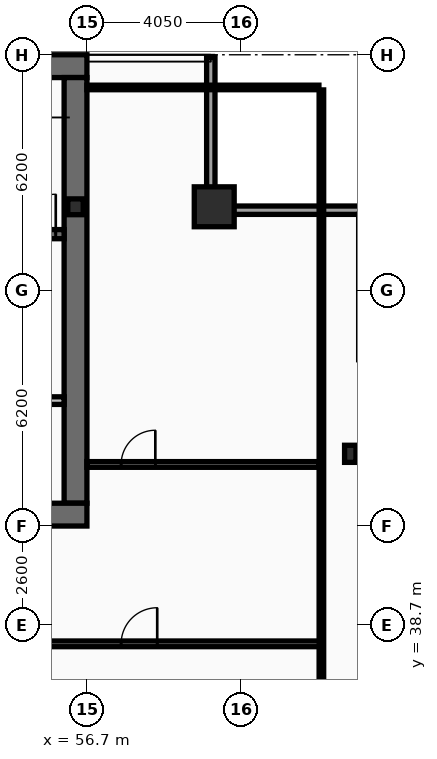
"""IFC4 building model, lengths in metres.
Left out: names, types, materials, properties, quantities, classifications, styles, units other than length and angle.
Written with IfcOpenShell. Run it as: python <this file> out.ifc"""

import sys

from ifc_helpers import new_model, si_unit, direction, frame, frame_2d, origin, origin_2d, place, context, subcontext, project, spatial, rectangle, hollow_rectangle, i_section, extrude, element, fill, save


model = new_model("IFC4")
c1 = context("Model", 3, precision=1e-05, world=origin(), true_north=direction((0.0, 1.0)))
c2 = subcontext(c1, "Body", "Model", "MODEL_VIEW")
j1 = project(units=[si_unit("LENGTHUNIT", "METRE"), si_unit("PLANEANGLEUNIT", "RADIAN")], contexts=[c1])
p1 = place(None, origin())
s1 = spatial("IfcSite", under=j1, at=p1, CompositionType="ELEMENT")
p2 = place(p1, origin())
s2 = spatial("IfcBuilding", under=s1, at=p2, CompositionType="ELEMENT")
p3 = place(p2, frame((0.0, 0.0, 239.0)))
s3 = spatial("IfcBuildingStorey", under=s2, at=p3, CompositionType="ELEMENT", Elevation=239.0)
p4 = place(p3, frame((16.2, 53.4, 0.0), z_axis=(0.0, 0.0, 1.0), x_axis=(1.0, 0.0, 0.0)))
e1 = element("IfcWall", 1, at=p4, inside=s3, PredefinedType="SHEAR", context=c2, shape_type="SweptSolid", body=[
    extrude(rectangle(XDim=40.5, YDim=0.6, at=frame_2d((20.25, 0.0))), origin(), (0.0, 0.0, 1.0), 3.44),
])
p5 = place(p3, frame((56.4, 53.1, 0.0), z_axis=(0.0, 0.0, 1.0), x_axis=(0.0, -1.0, 0.0)))
e2 = element("IfcWall", 2, at=p5, inside=s3, PredefinedType="SHEAR", context=c2, shape_type="SweptSolid", body=[
    extrude(rectangle(XDim=11.2, YDim=0.6, at=frame_2d((5.6, 0.0))), origin(), (0.0, 0.0, 1.0), 3.44),
])
p6 = place(p3, frame((56.7, 41.6, 0.0), z_axis=(0.0, 0.0, 1.0), x_axis=(-1.0, 0.0, 0.0)))
e3 = element("IfcWall", 3, at=p6, inside=s3, PredefinedType="SHEAR", context=c2, shape_type="SweptSolid", body=[
    extrude(rectangle(XDim=2.45, YDim=0.6, at=frame_2d((1.225, 0.0))), origin(), (0.0, 0.0, 1.0), 3.44),
])
p7 = place(p3, frame((48.63, 48.98, 0.0), z_axis=(0.0, 0.0, 1.0), x_axis=(1.0, 0.0, 0.0)))
e4 = element("IfcWall", 4, at=p7, inside=s3, PredefinedType="SHEAR", context=c2, shape_type="SweptSolid", body=[
    extrude(rectangle(XDim=7.47, YDim=0.24, at=frame_2d((3.735, 0.0))), origin(), (0.0, 0.0, 1.0), 3.44),
])
p8 = place(p7, frame((6.2, 0.0, 0.0)))
e5 = element("IfcOpeningElement", 5, at=p8, cuts=e4, PredefinedType="OPENING", context=c2, shape_type="SweptSolid", body=[
    extrude(rectangle(XDim=1.05, YDim=2.15, at=frame_2d((0.525, 1.075))), frame((0.0, 0.13, 0.0), z_axis=(0.0, -1.0, 0.0), x_axis=(1.0, 0.0, 0.0)), (0.0, 0.0, 1.0), 0.26),
])
p9 = place(p3, frame((60.05, 49.7, 0.0), z_axis=(0.0, 0.0, 1.0), x_axis=(1.0, 0.0, 0.0)))
e6 = element("IfcColumn", 6, at=p9, inside=s3, PredefinedType="COLUMN", context=c2, shape_type="SweptSolid", body=[
    extrude(hollow_rectangle(XDim=1.05, YDim=1.05, WallThickness=0.055, at=origin_2d()), origin(), (0.0, 0.0, 1.0), 3.6),
])
p10 = place(p3, frame((63.63, 43.2, 0.0), z_axis=(0.0, 0.0, 1.0), x_axis=(1.0, 0.0, 0.0)))
e7 = element("IfcColumn", 7, at=p10, inside=s3, PredefinedType="COLUMN", context=c2, shape_type="SweptSolid", body=[
    extrude(i_section(OverallWidth=0.3, OverallDepth=0.45, WebThickness=0.014, FlangeThickness=0.026, at=origin_2d()), origin(), (0.0, 0.0, 1.0), 3.6),
])
p11 = place(p3, frame((56.4, 49.7, 0.0), z_axis=(0.0, 0.0, 1.0), x_axis=(1.0, 0.0, 0.0)))
e8 = element("IfcColumn", 8, at=p11, inside=s3, PredefinedType="COLUMN", context=c2, shape_type="SweptSolid", body=[
    extrude(i_section(OverallWidth=0.406, OverallDepth=0.416, WebThickness=0.03, FlangeThickness=0.048, at=origin_2d()), origin(), (0.0, 0.0, 1.0), 3.6),
])
p12 = place(p3, frame((59.96, 53.63, 0.0), z_axis=(0.0, 0.0, 1.0), x_axis=(0.0, -1.0, 0.0)))
e9 = element("IfcWall", 9, at=p12, inside=s3, PredefinedType="SOLIDWALL", context=c2, shape_type="SweptSolid", body=[
    extrude(rectangle(XDim=3.91, YDim=0.22, at=frame_2d((1.955, 0.0))), origin(), (0.0, 0.0, 1.0), 2.83),
])
p13 = place(p3, frame((59.85, 49.61, 0.0), z_axis=(0.0, 0.0, 1.0), x_axis=(1.0, 0.0, 0.0)))
e10 = element("IfcWall", 10, at=p13, inside=s3, PredefinedType="SOLIDWALL", context=c2, shape_type="SweptSolid", body=[
    extrude(rectangle(XDim=4.22, YDim=0.22, at=frame_2d((2.11, 0.0))), origin(), (0.0, 0.0, 1.0), 2.83),
])
p14 = place(p3, frame((51.9, 44.6, 0.0), z_axis=(0.0, 0.0, 1.0), x_axis=(1.0, 0.0, 0.0)))
e11 = element("IfcWall", 11, at=p14, inside=s3, PredefinedType="PARTITIONING", context=c2, shape_type="SweptSolid", body=[
    extrude(rectangle(XDim=4.2, YDim=0.2, at=frame_2d((2.1, 0.0))), origin(), (0.0, 0.0, 1.0), 3.44),
])
p15 = place(p14, frame((1.15, 0.0, 0.0)))
e12 = element("IfcOpeningElement", 12, at=p15, cuts=e11, PredefinedType="OPENING", context=c2, shape_type="SweptSolid", body=[
    extrude(rectangle(XDim=1.05, YDim=2.15, at=frame_2d((0.525, 1.075))), frame((0.0, 0.11, 0.0), z_axis=(0.0, -1.0, 0.0), x_axis=(1.0, 0.0, 0.0)), (0.0, 0.0, 1.0), 0.22),
])
p16 = place(p3, frame((54.35, 38.2, 0.0), z_axis=(0.0, 0.0, 1.0), x_axis=(1.0, 0.0, 0.0)))
e13 = element("IfcWall", 13, at=p16, inside=s3, PredefinedType="PARTITIONING", context=c2, shape_type="SweptSolid", body=[
    extrude(rectangle(XDim=8.52, YDim=0.15, at=frame_2d((4.26, 0.0))), origin(), (0.0, 0.0, 1.0), 2.78),
])
p17 = place(p16, frame((3.25, 0.0, 0.0)))
e14 = element("IfcOpeningElement", 14, at=p17, cuts=e13, PredefinedType="OPENING", context=c2, shape_type="SweptSolid", body=[
    extrude(rectangle(XDim=0.95, YDim=2.05, at=frame_2d((0.475, 1.025))), frame((0.0, 0.085, 0.0), z_axis=(0.0, -1.0, 0.0), x_axis=(1.0, 0.0, 0.0)), (0.0, 0.0, 1.0), 0.17),
])
p18 = place(p3, frame((56.7, 42.92, 0.0), z_axis=(0.0, 0.0, 1.0), x_axis=(1.0, 0.0, 0.0)))
e15 = element("IfcWall", 15, at=p18, inside=s3, PredefinedType="PARTITIONING", context=c2, shape_type="SweptSolid", body=[
    extrude(rectangle(XDim=6.105, YDim=0.15, at=frame_2d((3.052, 0.0))), origin(), (0.0, 0.0, 1.0), 2.78),
])
p19 = place(p18, frame((0.9, 0.0, 0.0)))
e16 = element("IfcOpeningElement", 16, at=p19, cuts=e15, PredefinedType="OPENING", context=c2, shape_type="SweptSolid", body=[
    extrude(rectangle(XDim=0.9, YDim=2.05, at=frame_2d((0.45, 1.025))), frame((0.0, 0.085, 0.0), z_axis=(0.0, -1.0, 0.0), x_axis=(1.0, 0.0, 0.0)), (0.0, 0.0, 1.0), 0.17),
])
p20 = place(p3, frame((62.87, 10.665, 0.0), z_axis=(0.0, 0.0, 1.0), x_axis=(0.0, 1.0, 0.0)))
e17 = element("IfcWall", 17, at=p20, inside=s3, PredefinedType="PARTITIONING", context=c2, shape_type="SweptSolid", body=[
    extrude(rectangle(XDim=42.11, YDim=0.12, at=frame_2d((21.055, 0.0))), origin(), (0.0, 0.0, 1.0), 2.78),
])
p21 = place(p3, frame((56.7, 52.84, 0.0), z_axis=(0.0, 0.0, 1.0), x_axis=(1.0, 0.0, 0.0)))
e18 = element("IfcWall", 18, at=p21, inside=s3, PredefinedType="PARTITIONING", context=c2, shape_type="SweptSolid", body=[
    extrude(rectangle(XDim=6.105, YDim=0.12, at=frame_2d((3.052, 0.0))), origin(), (0.0, 0.0, 1.0), 3.44),
])
p22 = place(p8, origin())
e19 = element("IfcDoor", 19, at=p22, inside=s3, OperationType="SINGLE_SWING_RIGHT", PredefinedType="DOOR", context=c2, shape_type="SweptSolid", body=[
    extrude(rectangle(XDim=1.05, YDim=2.15, at=frame_2d((0.525, 1.075))), frame((0.0, 0.025, 0.0), z_axis=(0.0, -1.0, 0.0), x_axis=(1.0, 0.0, 0.0)), (0.0, 0.0, 1.0), 0.05),
])
fill(e5, e19)
p23 = place(p17, origin())
e20 = element("IfcDoor", 20, at=p23, inside=s3, OperationType="SINGLE_SWING_RIGHT", PredefinedType="DOOR", context=c2, shape_type="SweptSolid", body=[
    extrude(rectangle(XDim=0.95, YDim=2.05, at=frame_2d((0.475, 1.025))), frame((0.0, 0.025, 0.0), z_axis=(0.0, -1.0, 0.0), x_axis=(1.0, 0.0, 0.0)), (0.0, 0.0, 1.0), 0.05),
])
fill(e14, e20)
p24 = place(p19, origin())
e21 = element("IfcDoor", 21, at=p24, inside=s3, OperationType="SINGLE_SWING_RIGHT", PredefinedType="DOOR", context=c2, shape_type="SweptSolid", body=[
    extrude(rectangle(XDim=0.9, YDim=2.05, at=frame_2d((0.45, 1.025))), frame((0.0, 0.025, 0.0), z_axis=(0.0, -1.0, 0.0), x_axis=(1.0, 0.0, 0.0)), (0.0, 0.0, 1.0), 0.05),
])
fill(e16, e21)
save(model, sys.argv[1])
